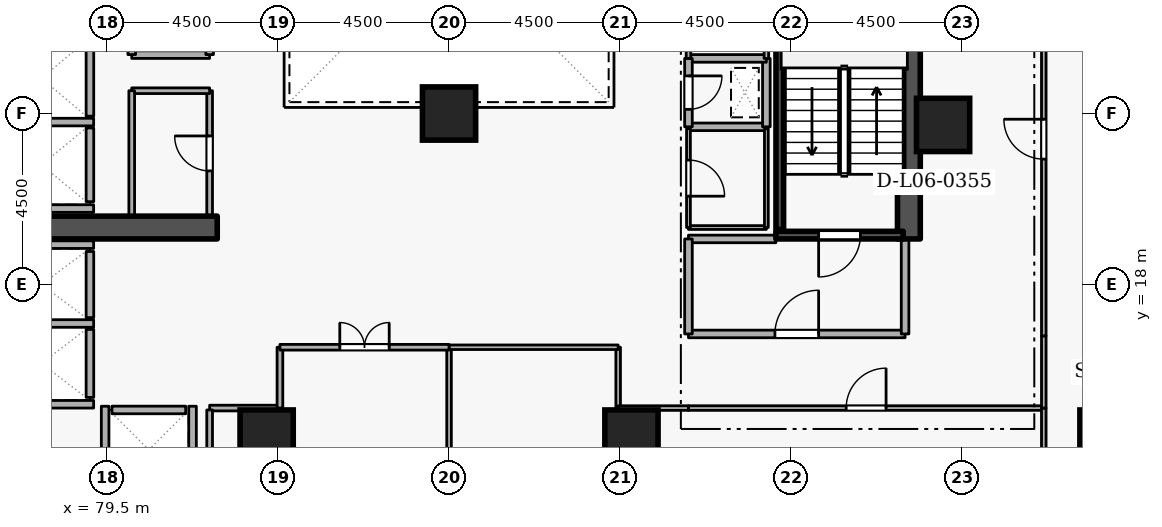
"""IFC4 building model, lengths in metres.
Left out: names, types, materials, properties, quantities, classifications, styles, units other than length and angle.
Written with IfcOpenShell. Run it as: python <this file> out.ifc"""

import sys

from ifc_helpers import new_model, si_unit, direction, frame, frame_2d, origin, origin_2d, place, context, subcontext, project, spatial, rectangle, extrude, element, fill, save


model = new_model("IFC4")
c1 = context("Model", 3, precision=1e-05, world=origin(), true_north=direction((0.0, 1.0)))
c2 = subcontext(c1, "Body", "Model", "MODEL_VIEW")
j1 = project(units=[si_unit("LENGTHUNIT", "METRE"), si_unit("PLANEANGLEUNIT", "RADIAN")], contexts=[c1])
p1 = place(None, origin())
s1 = spatial("IfcSite", under=j1, at=p1, CompositionType="ELEMENT")
p2 = place(p1, origin())
s2 = spatial("IfcBuilding", under=s1, at=p2, CompositionType="ELEMENT")
p3 = place(p2, frame((0.0, 0.0, 27.9)))
s3 = spatial("IfcBuildingStorey", under=s2, at=p3, CompositionType="ELEMENT", Elevation=27.9)
p4 = place(p3, frame((100.6, 19.2, 0.0), z_axis=(0.0, 0.0, 1.0), x_axis=(0.0, 1.0, 0.0)))
e1 = element("IfcWall", 1, at=p4, inside=s3, PredefinedType="SHEAR", context=c2, shape_type="SweptSolid", body=[
    extrude(rectangle(XDim=15.6, YDim=0.6, at=frame_2d((7.8, 0.0))), origin(), (0.0, 0.0, 1.0), 3.6),
])
p5 = place(p3, frame((76.7, 19.5, 0.0), z_axis=(0.0, 0.0, 1.0), x_axis=(1.0, 0.0, 0.0)))
e2 = element("IfcWall", 2, at=p5, inside=s3, PredefinedType="SHEAR", context=c2, shape_type="SweptSolid", body=[
    extrude(rectangle(XDim=5.7, YDim=0.6, at=frame_2d((2.85, 0.0))), origin(), (0.0, 0.0, 1.0), 3.6),
])
for number, where, z_axis, x_axis in (
    (3, (105.8, 14.0, 0.0), (0.0, 0.0, 1.0), (1.0, 0.0, 0.0)),
    (4, (93.3, 14.0, 0.0), (0.0, 0.0, 1.0), (1.0, 0.0, 0.0)),
    (5, (83.7, 14.0, 0.0), (0.0, 0.0, 1.0), (1.0, 0.0, 0.0)),
    (6, (101.5, 22.2, 0.0), (0.0, 0.0, 1.0), (1.0, 0.0, 0.0)),
    (7, (88.5, 22.5, 0.0), (0.0, 0.0, 1.0), (1.0, 0.0, 0.0)),
):
    element("IfcColumn", number, at=place(p3, frame(where, z_axis=z_axis, x_axis=x_axis)), inside=s3, PredefinedType="COLUMN", context=c2, shape_type="SweptSolid", body=[
        extrude(rectangle(XDim=1.4, YDim=1.4, at=origin_2d()), origin(), (0.0, 0.0, 1.0), 3.6),
    ])
p6 = place(p3, frame((79.05, 22.43, 0.0), z_axis=(0.0, 0.0, 1.0), x_axis=(0.0, 1.0, 0.0)))
e8 = element("IfcWall", 8, at=p6, inside=s3, PredefinedType="STANDARD", context=c2, shape_type="SweptSolid", body=[
    extrude(rectangle(XDim=1.99, YDim=0.2, at=frame_2d((0.995, 0.0))), origin(), (0.0, 0.0, 1.0), 3.34),
])
p7 = place(p3, frame((79.05, 20.18, 0.0), z_axis=(0.0, 0.0, 1.0), x_axis=(0.0, 1.0, 0.0)))
e9 = element("IfcWall", 9, at=p7, inside=s3, PredefinedType="STANDARD", context=c2, shape_type="SweptSolid", body=[
    extrude(rectangle(XDim=1.94, YDim=0.2, at=frame_2d((0.97, 0.0))), origin(), (0.0, 0.0, 1.0), 3.34),
])
p8 = place(p3, frame((79.05, 17.13, 0.0), z_axis=(0.0, 0.0, 1.0), x_axis=(0.0, 1.0, 0.0)))
e10 = element("IfcWall", 10, at=p8, inside=s3, PredefinedType="STANDARD", context=c2, shape_type="SweptSolid", body=[
    extrude(rectangle(XDim=1.74, YDim=0.2, at=frame_2d((0.87, 0.0))), origin(), (0.0, 0.0, 1.0), 3.34),
])
p9 = place(p3, frame((79.05, 15.03, 0.0), z_axis=(0.0, 0.0, 1.0), x_axis=(0.0, 1.0, 0.0)))
e11 = element("IfcWall", 11, at=p9, inside=s3, PredefinedType="STANDARD", context=c2, shape_type="SweptSolid", body=[
    extrude(rectangle(XDim=1.79, YDim=0.2, at=frame_2d((0.895, 0.0))), origin(), (0.0, 0.0, 1.0), 3.34),
])
p10 = place(p3, frame((79.63, 14.7, 0.0), z_axis=(0.0, 0.0, 1.0), x_axis=(1.0, 0.0, 0.0)))
e12 = element("IfcWall", 12, at=p10, inside=s3, PredefinedType="STANDARD", context=c2, shape_type="SweptSolid", body=[
    extrude(rectangle(XDim=1.94, YDim=0.2, at=frame_2d((0.97, 0.0))), origin(), (0.0, 0.0, 1.0), 3.34),
])
for number, where, z_axis, x_axis in (
    (13, (76.712, 22.275, 0.0), (0.0, 0.0, 1.0), (1.0, 0.0, 0.0)),
    (14, (76.712, 20.0, 0.0), (0.0, 0.0, 1.0), (1.0, 0.0, 0.0)),
):
    element("IfcWall", number, at=place(p3, frame(where, z_axis=z_axis, x_axis=x_axis)), inside=s3, PredefinedType="STANDARD", context=c2, shape_type="SweptSolid", body=[
        extrude(rectangle(XDim=2.436, YDim=0.2, at=frame_2d((1.218, 0.0))), origin(), (0.0, 0.0, 1.0), 3.34),
    ])
p11 = place(p3, frame((76.402, 19.05, 0.0), z_axis=(0.0, 0.0, 1.0), x_axis=(1.0, 0.0, 0.0)))
e15 = element("IfcWall", 15, at=p11, inside=s3, PredefinedType="STANDARD", context=c2, shape_type="SweptSolid", body=[
    extrude(rectangle(XDim=2.746, YDim=0.2, at=frame_2d((1.373, 0.0))), origin(), (0.0, 0.0, 1.0), 2.545),
])
p12 = place(p3, frame((76.402, 16.975, 0.0), z_axis=(0.0, 0.0, 1.0), x_axis=(1.0, 0.0, 0.0)))
e16 = element("IfcWall", 16, at=p12, inside=s3, PredefinedType="STANDARD", context=c2, shape_type="SweptSolid", body=[
    extrude(rectangle(XDim=2.746, YDim=0.2, at=frame_2d((1.373, 0.0))), origin(), (0.0, 0.0, 1.0), 3.34),
])
p13 = place(p3, frame((76.512, 14.85, 0.0), z_axis=(0.0, 0.0, 1.0), x_axis=(1.0, 0.0, 0.0)))
e17 = element("IfcWall", 17, at=p13, inside=s3, PredefinedType="STANDARD", context=c2, shape_type="SweptSolid", body=[
    extrude(rectangle(XDim=2.636, YDim=0.2, at=frame_2d((1.318, 0.0))), origin(), (0.0, 0.0, 1.0), 3.34),
])
for number, where, z_axis, x_axis in (
    (18, (81.75, 12.612, 0.0), (0.0, 0.0, 1.0), (0.0, 1.0, 0.0)),
    (19, (79.45, 12.612, 0.0), (0.0, 0.0, 1.0), (0.0, 1.0, 0.0)),
):
    element("IfcWall", number, at=place(p3, frame(where, z_axis=z_axis, x_axis=x_axis)), inside=s3, PredefinedType="STANDARD", context=c2, shape_type="SweptSolid", body=[
        extrude(rectangle(XDim=2.186, YDim=0.2, at=frame_2d((1.093, 0.0))), origin(), (0.0, 0.0, 1.0), 3.34),
    ])
p14 = place(p3, frame((100.45, 19.3, 0.0), z_axis=(0.0, 0.0, 1.0), x_axis=(-1.0, 0.0, 0.0)))
e20 = element("IfcWall", 20, at=p14, inside=s3, PredefinedType="SHEAR", context=c2, shape_type="SweptSolid", body=[
    extrude(rectangle(XDim=3.35, YDim=0.2, at=frame_2d((1.675, 0.0))), origin(), (0.0, 0.0, 1.0), 3.6),
])
p15 = place(p14, frame((1.125, 0.0, 0.0)))
e21 = element("IfcOpeningElement", 21, at=p15, cuts=e20, PredefinedType="OPENING", context=c2, shape_type="SweptSolid", body=[
    extrude(rectangle(XDim=1.1, YDim=2.1, at=frame_2d((0.55, 1.05))), frame((0.0, 0.11, 0.0), z_axis=(0.0, -1.0, 0.0), x_axis=(1.0, 0.0, 0.0)), (0.0, 0.0, 1.0), 0.22),
])
p16 = place(p3, frame((97.203, 26.55, 0.0), z_axis=(0.0, 0.0, 1.0), x_axis=(0.0, -1.0, 0.0)))
e22 = element("IfcWall", 22, at=p16, inside=s3, PredefinedType="SHEAR", context=c2, shape_type="SweptSolid", body=[
    extrude(rectangle(XDim=7.1, YDim=0.2, at=frame_2d((3.55, 0.0))), origin(), (0.0, 0.0, 1.0), 3.6),
])
p17 = place(p3, frame((94.8, 16.7, 0.0), z_axis=(0.0, 0.0, 1.0), x_axis=(1.0, 0.0, 0.0)))
e23 = element("IfcWall", 23, at=p17, inside=s3, PredefinedType="STANDARD", context=c2, shape_type="SweptSolid", body=[
    extrude(rectangle(XDim=5.7, YDim=0.2, at=frame_2d((2.85, 0.0))), origin(), (0.0, 0.0, 1.0), 3.34),
])
p18 = place(p17, frame((2.275, 0.0, 0.0)))
e24 = element("IfcOpeningElement", 24, at=p18, cuts=e23, PredefinedType="OPENING", context=c2, shape_type="SweptSolid", body=[
    extrude(rectangle(XDim=1.15, YDim=2.1, at=frame_2d((0.575, 1.05))), frame((0.0, 0.11, 0.0), z_axis=(0.0, -1.0, 0.0), x_axis=(1.0, 0.0, 0.0)), (0.0, 0.0, 1.0), 0.22),
])
p19 = place(p3, frame((100.5, 16.7, 0.0), z_axis=(0.0, 0.0, 1.0), x_axis=(0.0, 1.0, 0.0)))
e25 = element("IfcWall", 25, at=p19, inside=s3, PredefinedType="STANDARD", context=c2, shape_type="SweptSolid", body=[
    extrude(rectangle(XDim=2.5, YDim=0.2, at=frame_2d((1.25, 0.0))), origin(), (0.0, 0.0, 1.0), 3.34),
])
p20 = place(p3, frame((97.1, 19.2, 0.0), z_axis=(0.0, 0.0, 1.0), x_axis=(-1.0, 0.0, 0.0)))
e26 = element("IfcWall", 26, at=p20, inside=s3, PredefinedType="STANDARD", context=c2, shape_type="SweptSolid", body=[
    extrude(rectangle(XDim=2.3, YDim=0.2, at=frame_2d((1.15, 0.0))), origin(), (0.0, 0.0, 1.0), 2.545),
])
p21 = place(p3, frame((94.8, 19.2, 0.0), z_axis=(0.0, 0.0, 1.0), x_axis=(0.0, -1.0, 0.0)))
e27 = element("IfcWall", 27, at=p21, inside=s3, PredefinedType="STANDARD", context=c2, shape_type="SweptSolid", body=[
    extrude(rectangle(XDim=2.5, YDim=0.2, at=frame_2d((1.25, 0.0))), origin(), (0.0, 0.0, 1.0), 3.34),
])
p22 = place(p3, frame((94.8, 22.15, 0.0), z_axis=(0.0, 0.0, 1.0), x_axis=(1.0, 0.0, 0.0)))
e28 = element("IfcWall", 28, at=p22, inside=s3, PredefinedType="STANDARD", context=c2, shape_type="SweptSolid", body=[
    extrude(rectangle(XDim=2.05, YDim=0.2, at=frame_2d((1.025, 0.0))), origin(), (0.0, 0.0, 1.0), 3.34),
])
p23 = place(p3, frame((96.85, 22.15, 0.0), z_axis=(0.0, 0.0, 1.0), x_axis=(0.0, 1.0, 0.0)))
e29 = element("IfcWall", 29, at=p23, inside=s3, PredefinedType="STANDARD", context=c2, shape_type="SweptSolid", body=[
    extrude(rectangle(XDim=1.8, YDim=0.2, at=frame_2d((0.9, 0.0))), origin(), (0.0, 0.0, 1.0), 3.34),
])
p24 = place(p3, frame((96.85, 23.95, 0.0), z_axis=(0.0, 0.0, 1.0), x_axis=(-1.0, 0.0, 0.0)))
e30 = element("IfcWall", 30, at=p24, inside=s3, PredefinedType="STANDARD", context=c2, shape_type="SweptSolid", body=[
    extrude(rectangle(XDim=2.05, YDim=0.2, at=frame_2d((1.025, 0.0))), origin(), (0.0, 0.0, 1.0), 3.34),
])
p25 = place(p3, frame((94.8, 23.95, 0.0), z_axis=(0.0, 0.0, 1.0), x_axis=(0.0, -1.0, 0.0)))
e31 = element("IfcWall", 31, at=p25, inside=s3, PredefinedType="STANDARD", context=c2, shape_type="SweptSolid", body=[
    extrude(rectangle(XDim=1.8, YDim=0.2, at=frame_2d((0.9, 0.0))), origin(), (0.0, 0.0, 1.0), 3.34),
])
p26 = place(p25, frame((0.46, 0.0, 0.0)))
e32 = element("IfcOpeningElement", 32, at=p26, cuts=e31, PredefinedType="OPENING", context=c2, shape_type="SweptSolid", body=[
    extrude(rectangle(XDim=0.88, YDim=2.04, at=frame_2d((0.44, 1.02))), frame((0.0, 0.11, 0.0), z_axis=(0.0, -1.0, 0.0), x_axis=(1.0, 0.0, 0.0)), (0.0, 0.0, 1.0), 0.22),
])
p27 = place(p3, frame((80.15, 24.05, 0.0), z_axis=(0.0, 0.0, 1.0), x_axis=(1.0, 0.0, 0.0)))
e33 = element("IfcWall", 33, at=p27, inside=s3, PredefinedType="STANDARD", context=c2, shape_type="SweptSolid", body=[
    extrude(rectangle(XDim=2.05, YDim=0.2, at=frame_2d((1.025, 0.0))), origin(), (0.0, 0.0, 1.0), 3.34),
])
p28 = place(p3, frame((82.2, 24.05, 0.0), z_axis=(0.0, 0.0, 1.0), x_axis=(0.0, 1.0, 0.0)))
e34 = element("IfcWall", 34, at=p28, inside=s3, PredefinedType="STANDARD", context=c2, shape_type="SweptSolid", body=[
    extrude(rectangle(XDim=1.8, YDim=0.2, at=frame_2d((0.9, 0.0))), origin(), (0.0, 0.0, 1.0), 3.34),
])
p29 = place(p28, frame((0.46, 0.0, 0.0)))
e35 = element("IfcOpeningElement", 35, at=p29, cuts=e34, PredefinedType="OPENING", context=c2, shape_type="SweptSolid", body=[
    extrude(rectangle(XDim=0.88, YDim=2.04, at=frame_2d((0.44, 1.02))), frame((0.0, 0.11, 0.0), z_axis=(0.0, -1.0, 0.0), x_axis=(1.0, 0.0, 0.0)), (0.0, 0.0, 1.0), 0.22),
])
p30 = place(p3, frame((80.15, 25.85, 0.0), z_axis=(0.0, 0.0, 1.0), x_axis=(0.0, -1.0, 0.0)))
e36 = element("IfcWall", 36, at=p30, inside=s3, PredefinedType="STANDARD", context=c2, shape_type="SweptSolid", body=[
    extrude(rectangle(XDim=1.8, YDim=0.2, at=frame_2d((0.9, 0.0))), origin(), (0.0, 0.0, 1.0), 3.34),
])
p31 = place(p3, frame((94.8, 19.5, 0.0), z_axis=(0.0, 0.0, 1.0), x_axis=(1.0, 0.0, 0.0)))
e37 = element("IfcWall", 37, at=p31, inside=s3, PredefinedType="PARTITIONING", context=c2, shape_type="SweptSolid", body=[
    extrude(rectangle(XDim=2.05, YDim=0.1, at=frame_2d((1.025, 0.0))), origin(), (0.0, 0.0, 1.0), 2.545),
])
p32 = place(p3, frame((96.85, 19.5, 0.0), z_axis=(0.0, 0.0, 1.0), x_axis=(0.0, 1.0, 0.0)))
e38 = element("IfcWall", 38, at=p32, inside=s3, PredefinedType="PARTITIONING", context=c2, shape_type="SweptSolid", body=[
    extrude(rectangle(XDim=2.6, YDim=0.1, at=frame_2d((1.3, 0.0))), origin(), (0.0, 0.0, 1.0), 3.34),
])
p33 = place(p3, frame((94.8, 22.1, 0.0), z_axis=(0.0, 0.0, 1.0), x_axis=(0.0, -1.0, 0.0)))
e39 = element("IfcWall", 39, at=p33, inside=s3, PredefinedType="PARTITIONING", context=c2, shape_type="SweptSolid", body=[
    extrude(rectangle(XDim=2.6, YDim=0.1, at=frame_2d((1.3, 0.0))), origin(), (0.0, 0.0, 1.0), 3.34),
])
p34 = place(p33, frame((0.825, 0.0, 0.0)))
e40 = element("IfcOpeningElement", 40, at=p34, cuts=e39, PredefinedType="OPENING", context=c2, shape_type="SweptSolid", body=[
    extrude(rectangle(XDim=0.95, YDim=2.1, at=frame_2d((0.475, 1.05))), frame((0.0, 0.06, 0.0), z_axis=(0.0, -1.0, 0.0), x_axis=(1.0, 0.0, 0.0)), (0.0, 0.0, 1.0), 0.12),
])
p35 = place(p3, frame((94.8, 23.95, 0.0), z_axis=(0.0, 0.0, 1.0), x_axis=(0.0, 1.0, 0.0)))
e41 = element("IfcWall", 41, at=p35, inside=s3, PredefinedType="PARTITIONING", context=c2, shape_type="SweptSolid", body=[
    extrude(rectangle(XDim=2.1, YDim=0.12, at=frame_2d((1.05, 0.0))), origin(), (0.0, 0.0, 1.0), 3.34),
])
p36 = place(p35, frame((0.575, 0.0, 0.0)))
e42 = element("IfcOpeningElement", 42, at=p36, cuts=e41, PredefinedType="OPENING", context=c2, shape_type="SweptSolid", body=[
    extrude(rectangle(XDim=0.95, YDim=2.1, at=frame_2d((0.475, 1.05))), frame((0.0, 0.07, 0.0), z_axis=(0.0, -1.0, 0.0), x_axis=(1.0, 0.0, 0.0)), (0.0, 0.0, 1.0), 0.14),
])
p37 = place(p3, frame((96.85, 26.05, 0.0), z_axis=(0.0, 0.0, 1.0), x_axis=(0.0, -1.0, 0.0)))
e43 = element("IfcWall", 43, at=p37, inside=s3, PredefinedType="PARTITIONING", context=c2, shape_type="SweptSolid", body=[
    extrude(rectangle(XDim=2.1, YDim=0.12, at=frame_2d((1.05, 0.0))), origin(), (0.0, 0.0, 1.0), 3.34),
])
p38 = place(p3, frame((82.2, 19.8, 0.0), z_axis=(0.0, 0.0, 1.0), x_axis=(0.0, 1.0, 0.0)))
e44 = element("IfcWall", 44, at=p38, inside=s3, PredefinedType="PARTITIONING", context=c2, shape_type="SweptSolid", body=[
    extrude(rectangle(XDim=3.3, YDim=0.15, at=frame_2d((1.65, 0.0))), origin(), (0.0, 0.0, 1.0), 3.34),
])
p39 = place(p38, frame((1.19, 0.0, 0.0)))
e45 = element("IfcOpeningElement", 45, at=p39, cuts=e44, PredefinedType="OPENING", context=c2, shape_type="SweptSolid", body=[
    extrude(rectangle(XDim=0.92, YDim=2.08, at=frame_2d((0.46, 1.04))), frame((0.0, 0.085, 0.0), z_axis=(0.0, -1.0, 0.0), x_axis=(1.0, 0.0, 0.0)), (0.0, 0.0, 1.0), 0.17),
])
p40 = place(p3, frame((82.2, 23.1, 0.0), z_axis=(0.0, 0.0, 1.0), x_axis=(-1.0, 0.0, 0.0)))
e46 = element("IfcWall", 46, at=p40, inside=s3, PredefinedType="PARTITIONING", context=c2, shape_type="SweptSolid", body=[
    extrude(rectangle(XDim=2.05, YDim=0.15, at=frame_2d((1.025, 0.0))), origin(), (0.0, 0.0, 1.0), 3.34),
])
p41 = place(p3, frame((80.15, 23.1, 0.0), z_axis=(0.0, 0.0, 1.0), x_axis=(0.0, -1.0, 0.0)))
e47 = element("IfcWall", 47, at=p41, inside=s3, PredefinedType="PARTITIONING", context=c2, shape_type="SweptSolid", body=[
    extrude(rectangle(XDim=3.3, YDim=0.15, at=frame_2d((1.65, 0.0))), origin(), (0.0, 0.0, 1.0), 3.34),
])
p42 = place(p3, frame((92.95, 16.35, 0.0), z_axis=(0.0, 0.0, 1.0), x_axis=(0.0, -1.0, 0.0)))
e48 = element("IfcWall", 48, at=p42, inside=s3, PredefinedType="PARTITIONING", context=c2, shape_type="SweptSolid", body=[
    extrude(rectangle(XDim=1.6, YDim=0.12, at=frame_2d((0.8, 0.0))), origin(), (0.0, 0.0, 1.0), 3.34),
])
p43 = place(p3, frame((92.95, 14.75, 0.0), z_axis=(0.0, 0.0, 1.0), x_axis=(1.0, 0.0, 0.0)))
e49 = element("IfcWall", 49, at=p43, inside=s3, PredefinedType="PARTITIONING", context=c2, shape_type="SweptSolid", body=[
    extrude(rectangle(XDim=1.85, YDim=0.12, at=frame_2d((0.925, 0.0))), origin(), (0.0, 0.0, 1.0), 3.34),
])
p44 = place(p3, frame((94.8, 14.75, 0.0), z_axis=(0.0, 0.0, 1.0), x_axis=(1.0, 0.0, 0.0)))
e50 = element("IfcWall", 50, at=p44, inside=s3, PredefinedType="PARTITIONING", context=c2, shape_type="SweptSolid", body=[
    extrude(rectangle(XDim=9.35, YDim=0.12, at=frame_2d((4.675, 0.0))), origin(), (0.0, 0.0, 1.0), 3.34),
])
p45 = place(p44, frame((4.15, 0.0, 0.0)))
e51 = element("IfcOpeningElement", 51, at=p45, cuts=e50, PredefinedType="OPENING", context=c2, shape_type="SweptSolid", body=[
    extrude(rectangle(XDim=1.05, YDim=2.1, at=frame_2d((0.525, 1.05))), frame((0.0, 0.07, 0.0), z_axis=(0.0, -1.0, 0.0), x_axis=(1.0, 0.0, 0.0)), (0.0, 0.0, 1.0), 0.14),
])
p46 = place(p3, frame((104.15, 14.75, 0.0), z_axis=(0.0, 0.0, 1.0), x_axis=(0.0, -1.0, 0.0)))
e52 = element("IfcWall", 52, at=p46, inside=s3, PredefinedType="PARTITIONING", context=c2, shape_type="SweptSolid", body=[
    extrude(rectangle(XDim=11.97, YDim=0.12, at=frame_2d((5.985, 0.0))), origin(), (0.0, 0.0, 1.0), 3.34),
])
p47 = place(p3, frame((88.5, 2.78, 0.0), z_axis=(0.0, 0.0, 1.0), x_axis=(0.0, 1.0, 0.0)))
e53 = element("IfcWall", 53, at=p47, inside=s3, PredefinedType="PARTITIONING", context=c2, shape_type="SweptSolid", body=[
    extrude(rectangle(XDim=13.57, YDim=0.12, at=frame_2d((6.785, 0.0))), origin(), (0.0, 0.0, 1.0), 2.878),
])
p48 = place(p3, frame((88.5, 16.35, 0.0), z_axis=(0.0, 0.0, 1.0), x_axis=(1.0, 0.0, 0.0)))
e54 = element("IfcWall", 54, at=p48, inside=s3, PredefinedType="PARTITIONING", context=c2, shape_type="SweptSolid", body=[
    extrude(rectangle(XDim=4.45, YDim=0.12, at=frame_2d((2.225, 0.0))), origin(), (0.0, 0.0, 1.0), 3.34),
])
p49 = place(p3, frame((82.2, 14.75, 0.0), z_axis=(0.0, 0.0, 1.0), x_axis=(1.0, 0.0, 0.0)))
e55 = element("IfcWall", 55, at=p49, inside=s3, PredefinedType="PARTITIONING", context=c2, shape_type="SweptSolid", body=[
    extrude(rectangle(XDim=1.85, YDim=0.15, at=frame_2d((0.925, 0.0))), origin(), (0.0, 0.0, 1.0), 3.34),
])
p50 = place(p3, frame((84.05, 14.75, 0.0), z_axis=(0.0, 0.0, 1.0), x_axis=(0.0, 1.0, 0.0)))
e56 = element("IfcWall", 56, at=p50, inside=s3, PredefinedType="PARTITIONING", context=c2, shape_type="SweptSolid", body=[
    extrude(rectangle(XDim=1.6, YDim=0.15, at=frame_2d((0.8, 0.0))), origin(), (0.0, 0.0, 1.0), 3.34),
])
p51 = place(p3, frame((84.05, 16.35, 0.0), z_axis=(0.0, 0.0, 1.0), x_axis=(1.0, 0.0, 0.0)))
e57 = element("IfcWall", 57, at=p51, inside=s3, PredefinedType="PARTITIONING", context=c2, shape_type="SweptSolid", body=[
    extrude(rectangle(XDim=4.45, YDim=0.15, at=frame_2d((2.225, 0.0))), origin(), (0.0, 0.0, 1.0), 3.34),
])
p52 = place(p51, frame((1.575, 0.0, 0.0)))
e58 = element("IfcOpeningElement", 58, at=p52, cuts=e57, PredefinedType="OPENING", context=c2, shape_type="SweptSolid", body=[
    extrude(rectangle(XDim=1.3, YDim=2.12, at=frame_2d((0.65, 1.06))), frame((0.0, 0.085, 0.0), z_axis=(0.0, -1.0, 0.0), x_axis=(1.0, 0.0, 0.0)), (0.0, 0.0, 1.0), 0.17),
])
p53 = place(p3, frame((82.2, 12.4, 0.0), z_axis=(0.0, 0.0, 1.0), x_axis=(0.0, 1.0, 0.0)))
e59 = element("IfcWall", 59, at=p53, inside=s3, PredefinedType="PARTITIONING", context=c2, shape_type="SweptSolid", body=[
    extrude(rectangle(XDim=2.3, YDim=0.15, at=frame_2d((1.15, 0.0))), origin(), (0.0, 0.0, 1.0), 3.34),
])
p54 = place(p3, frame((104.15, 14.75, 0.0), z_axis=(0.0, 0.0, 1.0), x_axis=(0.0, 1.0, 0.0)))
e60 = element("IfcWall", 60, at=p54, inside=s3, PredefinedType="PARTITIONING", context=c2, shape_type="SweptSolid", body=[
    extrude(rectangle(XDim=1.9, YDim=0.12, at=frame_2d((0.95, 0.0))), origin(), (0.0, 0.0, 1.0), 3.34),
])
p55 = place(p3, frame((104.15, 16.65, 0.0), z_axis=(0.0, 0.0, 1.0), x_axis=(0.0, 1.0, 0.0)))
e61 = element("IfcWall", 61, at=p55, inside=s3, PredefinedType="PARTITIONING", context=c2, shape_type="SweptSolid", body=[
    extrude(rectangle(XDim=10.35, YDim=0.12, at=frame_2d((5.175, 0.0))), origin(), (0.0, 0.0, 1.0), 3.34),
])
p56 = place(p55, frame((4.65, 0.0, 0.0)))
e62 = element("IfcOpeningElement", 62, at=p56, cuts=e61, PredefinedType="OPENING", context=c2, shape_type="SweptSolid", body=[
    extrude(rectangle(XDim=1.05, YDim=2.1, at=frame_2d((0.525, 1.05))), frame((0.0, 0.07, 0.0), z_axis=(0.0, -1.0, 0.0), x_axis=(1.0, 0.0, 0.0)), (0.0, 0.0, 1.0), 0.14),
])
p57 = place(p15, origin())
e63 = element("IfcDoor", 63, at=p57, inside=s3, OperationType="SINGLE_SWING_RIGHT", PredefinedType="DOOR", context=c2, shape_type="SweptSolid", body=[
    extrude(rectangle(XDim=1.1, YDim=2.1, at=frame_2d((0.55, 1.05))), frame((0.0, 0.025, 0.0), z_axis=(0.0, -1.0, 0.0), x_axis=(1.0, 0.0, 0.0)), (0.0, 0.0, 1.0), 0.05),
])
fill(e21, e63)
p58 = place(p18, origin())
e64 = element("IfcDoor", 64, at=p58, inside=s3, OperationType="SINGLE_SWING_RIGHT", PredefinedType="DOOR", context=c2, shape_type="SweptSolid", body=[
    extrude(rectangle(XDim=1.15, YDim=2.1, at=frame_2d((0.575, 1.05))), frame((0.0, 0.025, 0.0), z_axis=(0.0, -1.0, 0.0), x_axis=(1.0, 0.0, 0.0)), (0.0, 0.0, 1.0), 0.05),
])
fill(e24, e64)
p59 = place(p26, origin())
e65 = element("IfcDoor", 65, at=p59, inside=s3, OperationType="SINGLE_SWING_LEFT", PredefinedType="DOOR", context=c2, shape_type="SweptSolid", body=[
    extrude(rectangle(XDim=0.88, YDim=2.04, at=frame_2d((0.44, 1.02))), frame((0.0, 0.025, 0.0), z_axis=(0.0, -1.0, 0.0), x_axis=(1.0, 0.0, 0.0)), (0.0, 0.0, 1.0), 0.05),
])
fill(e32, e65)
p60 = place(p34, origin())
e66 = element("IfcDoor", 66, at=p60, inside=s3, OperationType="SINGLE_SWING_RIGHT", PredefinedType="DOOR", context=c2, shape_type="SweptSolid", body=[
    extrude(rectangle(XDim=0.95, YDim=2.1, at=frame_2d((0.475, 1.05))), frame((0.0, 0.025, 0.0), z_axis=(0.0, -1.0, 0.0), x_axis=(1.0, 0.0, 0.0)), (0.0, 0.0, 1.0), 0.05),
])
fill(e40, e66)
p61 = place(p39, origin())
e67 = element("IfcDoor", 67, at=p61, inside=s3, OperationType="SINGLE_SWING_RIGHT", PredefinedType="DOOR", context=c2, shape_type="SweptSolid", body=[
    extrude(rectangle(XDim=0.92, YDim=2.08, at=frame_2d((0.46, 1.04))), frame((0.0, 0.025, 0.0), z_axis=(0.0, -1.0, 0.0), x_axis=(1.0, 0.0, 0.0)), (0.0, 0.0, 1.0), 0.05),
])
fill(e45, e67)
p62 = place(p45, origin())
e68 = element("IfcDoor", 68, at=p62, inside=s3, OperationType="SINGLE_SWING_RIGHT", PredefinedType="DOOR", context=c2, shape_type="SweptSolid", body=[
    extrude(rectangle(XDim=1.05, YDim=2.1, at=frame_2d((0.525, 1.05))), frame((0.0, 0.025, 0.0), z_axis=(0.0, -1.0, 0.0), x_axis=(1.0, 0.0, 0.0)), (0.0, 0.0, 1.0), 0.05),
])
fill(e51, e68)
p63 = place(p52, origin())
e69 = element("IfcDoor", 69, at=p63, inside=s3, OperationType="DOUBLE_DOOR_SINGLE_SWING", PredefinedType="DOOR", context=c2, shape_type="SweptSolid", body=[
    extrude(rectangle(XDim=1.3, YDim=2.12, at=frame_2d((0.65, 1.06))), frame((0.0, 0.025, 0.0), z_axis=(0.0, -1.0, 0.0), x_axis=(1.0, 0.0, 0.0)), (0.0, 0.0, 1.0), 0.05),
])
fill(e58, e69)
p64 = place(p56, origin())
e70 = element("IfcDoor", 70, at=p64, inside=s3, OperationType="SINGLE_SWING_RIGHT", PredefinedType="DOOR", context=c2, shape_type="SweptSolid", body=[
    extrude(rectangle(XDim=1.05, YDim=2.1, at=frame_2d((0.525, 1.05))), frame((0.0, 0.025, 0.0), z_axis=(0.0, -1.0, 0.0), x_axis=(1.0, 0.0, 0.0)), (0.0, 0.0, 1.0), 0.05),
])
fill(e62, e70)
save(model, sys.argv[1])
